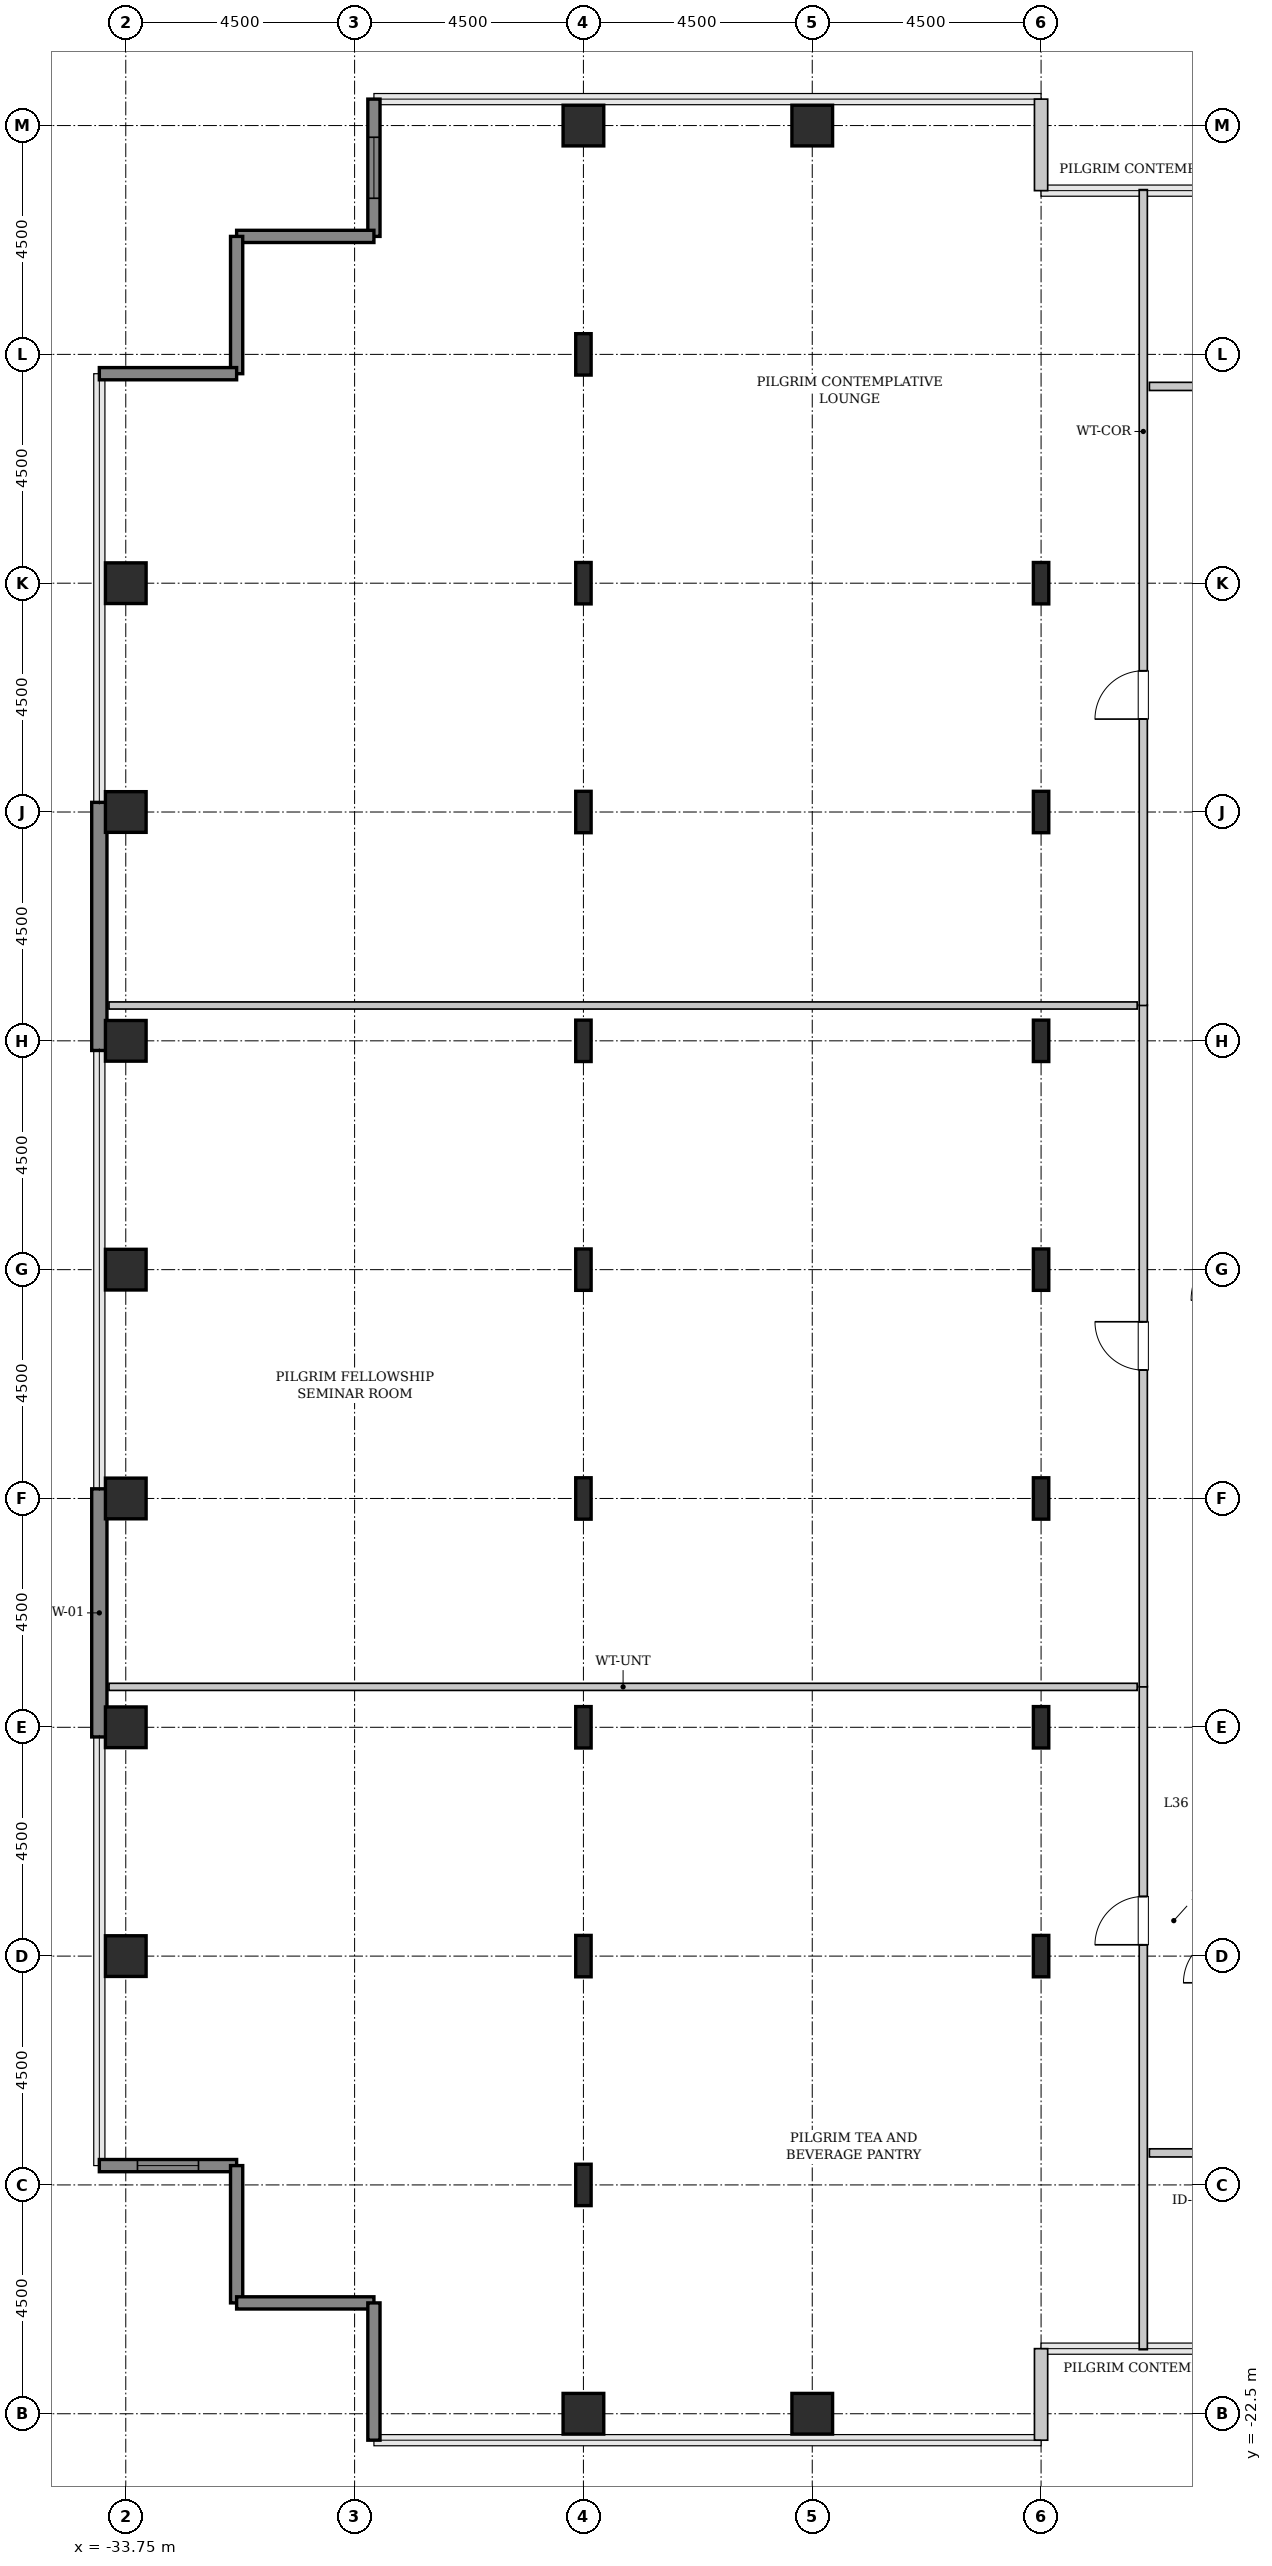
"""IFC4 building model, lengths in metres.
Left out: names, types, materials, properties, quantities, classifications, styles, units other than length and angle.
Written with IfcOpenShell. Run it as: python <this file> out.ifc"""

import sys

from ifc_helpers import new_model, si_unit, direction, frame, frame_2d, origin, origin_2d, place, context, subcontext, project, spatial, rectangle, hollow_rectangle, i_section, extrude, source, transform, mapped, element, fill, save


model = new_model("IFC4")
c1 = context("Model", 3, precision=1e-05, world=origin(), true_north=direction((0.0, 1.0)))
c2 = subcontext(c1, "Body", "Model", "MODEL_VIEW")
j1 = project(units=[si_unit("LENGTHUNIT", "METRE"), si_unit("PLANEANGLEUNIT", "RADIAN")], contexts=[c1])
p1 = place(None, origin())
s1 = spatial("IfcSite", under=j1, at=p1, CompositionType="ELEMENT")
p2 = place(p1, origin())
s2 = spatial("IfcBuilding", under=s1, at=p2, CompositionType="ELEMENT")
p3 = place(p2, frame((0.0, 0.0, 148.8)))
s3 = spatial("IfcBuildingStorey", under=s2, at=p3, CompositionType="ELEMENT", Elevation=148.8)
m1 = source(origin(), c2, "Body", "SweptSolid", [
    extrude(hollow_rectangle(XDim=0.8, YDim=0.8, WallThickness=0.04, InnerFilletRadius=0.04, OuterFilletRadius=0.08, at=origin_2d()), origin(), (0.0, 0.0, 1.0), 3.8),
])
for number, where, z_axis, x_axis in (
    (1, (-33.75, -13.5, 0.0), (0.0, 0.0, 1.0), (1.0, 0.0, 0.0)),
    (2, (-33.75, -9.0, 0.0), (0.0, 0.0, 1.0), (1.0, 0.0, 0.0)),
    (3, (-33.75, -4.5, 0.0), (0.0, 0.0, 1.0), (1.0, 0.0, 0.0)),
    (4, (-33.75, 0.0, 0.0), (0.0, 0.0, 1.0), (1.0, 0.0, 0.0)),
    (5, (-33.75, 4.5, 0.0), (0.0, 0.0, 1.0), (1.0, 0.0, 0.0)),
    (6, (-33.75, 9.0, 0.0), (0.0, 0.0, 1.0), (1.0, 0.0, 0.0)),
    (7, (-33.75, 13.5, 0.0), (0.0, 0.0, 1.0), (1.0, 0.0, 0.0)),
    (8, (-24.75, -22.5, 0.0), (0.0, 0.0, 1.0), (1.0, 0.0, 0.0)),
):
    element("IfcColumn", number, at=place(p3, frame(where, z_axis=z_axis, x_axis=x_axis)), inside=s3, PredefinedType="COLUMN", context=c2, shape_type="MappedRepresentation", body=[
        mapped(m1, transform((0.0, 0.0, 0.0), x_axis=(1.0, 0.0, 0.0), y_axis=(0.0, 1.0, 0.0), z_axis=(0.0, 0.0, 1.0), scale=1.0)),
    ])
m2 = source(origin(), c2, "Body", "SweptSolid", [
    extrude(i_section(OverallWidth=0.303, OverallDepth=0.814, WebThickness=0.021, FlangeThickness=0.04, FilletRadius=0.03, at=origin_2d()), origin(), (0.0, 0.0, 1.0), 3.8),
])
for number, where, z_axis, x_axis in (
    (9, (-24.75, -18.0, 0.0), (0.0, 0.0, 1.0), (1.0, 0.0, 0.0)),
    (10, (-24.75, -13.5, 0.0), (0.0, 0.0, 1.0), (1.0, 0.0, 0.0)),
    (11, (-24.75, -9.0, 0.0), (0.0, 0.0, 1.0), (1.0, 0.0, 0.0)),
    (12, (-24.75, -4.5, 0.0), (0.0, 0.0, 1.0), (1.0, 0.0, 0.0)),
    (13, (-24.75, 0.0, 0.0), (0.0, 0.0, 1.0), (1.0, 0.0, 0.0)),
    (14, (-24.75, 4.5, 0.0), (0.0, 0.0, 1.0), (1.0, 0.0, 0.0)),
    (15, (-24.75, 9.0, 0.0), (0.0, 0.0, 1.0), (1.0, 0.0, 0.0)),
    (16, (-24.75, 13.5, 0.0), (0.0, 0.0, 1.0), (1.0, 0.0, 0.0)),
    (17, (-24.75, 18.0, 0.0), (0.0, 0.0, 1.0), (1.0, 0.0, 0.0)),
):
    element("IfcColumn", number, at=place(p3, frame(where, z_axis=z_axis, x_axis=x_axis)), inside=s3, PredefinedType="COLUMN", context=c2, shape_type="MappedRepresentation", body=[
        mapped(m2, transform((0.0, 0.0, 0.0), x_axis=(1.0, 0.0, 0.0), y_axis=(0.0, 1.0, 0.0), z_axis=(0.0, 0.0, 1.0), scale=1.0)),
    ])
for number, where, z_axis, x_axis in (
    (18, (-24.75, 22.5, 0.0), (0.0, 0.0, 1.0), (1.0, 0.0, 0.0)),
    (19, (-20.25, -22.5, 0.0), (0.0, 0.0, 1.0), (1.0, 0.0, 0.0)),
    (20, (-20.25, 22.5, 0.0), (0.0, 0.0, 1.0), (1.0, 0.0, 0.0)),
):
    element("IfcColumn", number, at=place(p3, frame(where, z_axis=z_axis, x_axis=x_axis)), inside=s3, PredefinedType="COLUMN", context=c2, shape_type="MappedRepresentation", body=[
        mapped(m1, transform((0.0, 0.0, 0.0), x_axis=(1.0, 0.0, 0.0), y_axis=(0.0, 1.0, 0.0), z_axis=(0.0, 0.0, 1.0), scale=1.0)),
    ])
for number, where, z_axis, x_axis in (
    (21, (-15.75, -13.5, 0.0), (0.0, 0.0, 1.0), (1.0, 0.0, 0.0)),
    (22, (-15.75, -9.0, 0.0), (0.0, 0.0, 1.0), (1.0, 0.0, 0.0)),
    (23, (-15.75, -4.5, 0.0), (0.0, 0.0, 1.0), (1.0, 0.0, 0.0)),
    (24, (-15.75, 0.0, 0.0), (0.0, 0.0, 1.0), (1.0, 0.0, 0.0)),
    (25, (-15.75, 4.5, 0.0), (0.0, 0.0, 1.0), (1.0, 0.0, 0.0)),
    (26, (-15.75, 9.0, 0.0), (0.0, 0.0, 1.0), (1.0, 0.0, 0.0)),
    (27, (-15.75, 13.5, 0.0), (0.0, 0.0, 1.0), (1.0, 0.0, 0.0)),
):
    element("IfcColumn", number, at=place(p3, frame(where, z_axis=z_axis, x_axis=x_axis)), inside=s3, PredefinedType="COLUMN", context=c2, shape_type="MappedRepresentation", body=[
        mapped(m2, transform((0.0, 0.0, 0.0), x_axis=(1.0, 0.0, 0.0), y_axis=(0.0, 1.0, 0.0), z_axis=(0.0, 0.0, 1.0), scale=1.0)),
    ])
m3 = source(origin(), c2, "Body", "SweptSolid", [
    extrude(rectangle(XDim=4.88, YDim=0.3, at=frame_2d((2.44, 0.0))), origin(), (0.0, 0.0, 1.0), 3.55),
])
for number, where, z_axis, x_axis in (
    (28, (-34.27, -9.19, 0.0), (0.0, 0.0, 1.0), (0.0, 1.0, 0.0)),
    (29, (-34.27, 4.31, 0.0), (0.0, 0.0, 1.0), (0.0, 1.0, 0.0)),
):
    element("IfcWall", number, at=place(p3, frame(where, z_axis=z_axis, x_axis=x_axis)), inside=s3, PredefinedType="SHEAR", context=c2, shape_type="MappedRepresentation", body=[
        mapped(m3, transform((0.0, 0.0, 0.0), x_axis=(1.0, 0.0, 0.0), y_axis=(0.0, 1.0, 0.0), z_axis=(0.0, 0.0, 1.0), scale=1.0)),
    ])
m4 = source(origin(), c2, "Body", "SweptSolid", [
    extrude(rectangle(XDim=1.8, YDim=0.26, at=frame_2d((0.9, 0.0))), origin(), (0.0, 0.0, 1.0), 3.55),
])
p4 = place(p3, frame((-15.75, 21.22, 0.0), z_axis=(0.0, 0.0, 1.0), x_axis=(0.0, 1.0, 0.0)))
e30 = element("IfcWall", 30, at=p4, inside=s3, PredefinedType="SOLIDWALL", context=c2, shape_type="MappedRepresentation", body=[
    mapped(m4, transform((0.0, 0.0, 0.0), x_axis=(1.0, 0.0, 0.0), y_axis=(0.0, 1.0, 0.0), z_axis=(0.0, 0.0, 1.0), scale=1.0)),
])
m5 = source(origin(), c2, "Body", "SweptSolid", [
    extrude(rectangle(XDim=2.7, YDim=0.24, at=frame_2d((1.35, 0.0))), origin(), (0.0, 0.0, 1.0), 3.55),
])
p5 = place(p3, frame((-28.87, 23.02, 0.0), z_axis=(0.0, 0.0, 1.0), x_axis=(0.0, -1.0, 0.0)))
e31 = element("IfcWall", 31, at=p5, inside=s3, PredefinedType="SHEAR", context=c2, shape_type="MappedRepresentation", body=[
    mapped(m5, transform((0.0, 0.0, 0.0), x_axis=(1.0, 0.0, 0.0), y_axis=(0.0, 1.0, 0.0), z_axis=(0.0, 0.0, 1.0), scale=1.0)),
])
p6 = place(p5, frame((0.75, 0.0, 0.85)))
e32 = element("IfcOpeningElement", 32, at=p6, cuts=e31, PredefinedType="OPENING", context=c2, shape_type="SweptSolid", body=[
    extrude(rectangle(XDim=1.2, YDim=1.8, at=frame_2d((0.6, 0.9))), frame((0.0, 0.13, 0.0), z_axis=(0.0, -1.0, 0.0), x_axis=(1.0, 0.0, 0.0)), (0.0, 0.0, 1.0), 0.26),
])
for number, where, z_axis, x_axis in (
    (33, (-28.87, 20.32, 0.0), (0.0, 0.0, 1.0), (-1.0, 0.0, 0.0)),
    (34, (-31.57, 20.32, 0.0), (0.0, 0.0, 1.0), (0.0, -1.0, 0.0)),
    (35, (-31.57, 17.62, 0.0), (0.0, 0.0, 1.0), (-1.0, 0.0, 0.0)),
):
    element("IfcWall", number, at=place(p3, frame(where, z_axis=z_axis, x_axis=x_axis)), inside=s3, PredefinedType="SHEAR", context=c2, shape_type="MappedRepresentation", body=[
        mapped(m5, transform((0.0, 0.0, 0.0), x_axis=(1.0, 0.0, 0.0), y_axis=(0.0, 1.0, 0.0), z_axis=(0.0, 0.0, 1.0), scale=1.0)),
    ])
p7 = place(p3, frame((-34.27, -17.62, 0.0), z_axis=(0.0, 0.0, 1.0), x_axis=(1.0, 0.0, 0.0)))
e36 = element("IfcWall", 36, at=p7, inside=s3, PredefinedType="SHEAR", context=c2, shape_type="MappedRepresentation", body=[
    mapped(m5, transform((0.0, 0.0, 0.0), x_axis=(1.0, 0.0, 0.0), y_axis=(0.0, 1.0, 0.0), z_axis=(0.0, 0.0, 1.0), scale=1.0)),
])
p8 = place(p7, frame((0.75, 0.0, 0.85)))
e37 = element("IfcOpeningElement", 37, at=p8, cuts=e36, PredefinedType="OPENING", context=c2, shape_type="SweptSolid", body=[
    extrude(rectangle(XDim=1.2, YDim=1.8, at=frame_2d((0.6, 0.9))), frame((0.0, 0.13, 0.0), z_axis=(0.0, -1.0, 0.0), x_axis=(1.0, 0.0, 0.0)), (0.0, 0.0, 1.0), 0.26),
])
for number, where, z_axis, x_axis in (
    (38, (-31.57, -17.62, 0.0), (0.0, 0.0, 1.0), (0.0, -1.0, 0.0)),
    (39, (-31.57, -20.32, 0.0), (0.0, 0.0, 1.0), (1.0, 0.0, 0.0)),
    (40, (-28.87, -20.32, 0.0), (0.0, 0.0, 1.0), (0.0, -1.0, 0.0)),
):
    element("IfcWall", number, at=place(p3, frame(where, z_axis=z_axis, x_axis=x_axis)), inside=s3, PredefinedType="SHEAR", context=c2, shape_type="MappedRepresentation", body=[
        mapped(m5, transform((0.0, 0.0, 0.0), x_axis=(1.0, 0.0, 0.0), y_axis=(0.0, 1.0, 0.0), z_axis=(0.0, 0.0, 1.0), scale=1.0)),
    ])
p9 = place(p3, frame((-15.75, -23.02, 0.0), z_axis=(0.0, 0.0, 1.0), x_axis=(0.0, 1.0, 0.0)))
e41 = element("IfcWall", 41, at=p9, inside=s3, PredefinedType="SOLIDWALL", context=c2, shape_type="MappedRepresentation", body=[
    mapped(m4, transform((0.0, 0.0, 0.0), x_axis=(1.0, 0.0, 0.0), y_axis=(0.0, 1.0, 0.0), z_axis=(0.0, 0.0, 1.0), scale=1.0)),
])
m6 = source(origin(), c2, "Body", "SweptSolid", [
    extrude(rectangle(XDim=13.045, YDim=0.16, at=frame_2d((6.522, 0.0))), origin(), (0.0, 0.0, 1.0), 3.535),
])
p10 = place(p3, frame((-13.74, -21.24, 0.0), z_axis=(0.0, 0.0, 1.0), x_axis=(0.0, 1.0, 0.0)))
e42 = element("IfcWall", 42, at=p10, inside=s3, PredefinedType="PARTITIONING", context=c2, shape_type="MappedRepresentation", body=[
    mapped(m6, transform((0.0, 0.0, 0.0), x_axis=(1.0, 0.0, 0.0), y_axis=(0.0, 1.0, 0.0), z_axis=(0.0, 0.0, 1.0), scale=1.0)),
])
p11 = place(p10, frame((7.962, 0.0, 0.0)))
e43 = element("IfcOpeningElement", 43, at=p11, cuts=e42, PredefinedType="OPENING", context=c2, shape_type="SweptSolid", body=[
    extrude(rectangle(XDim=0.95, YDim=2.1, at=frame_2d((0.475, 1.05))), frame((0.0, 0.09, 0.0), z_axis=(0.0, -1.0, 0.0), x_axis=(1.0, 0.0, 0.0)), (0.0, 0.0, 1.0), 0.18),
])
m7 = source(origin(), c2, "Body", "SweptSolid", [
    extrude(rectangle(XDim=20.22, YDim=0.14, at=frame_2d((10.11, 0.0))), origin(), (0.0, 0.0, 1.0), 3.535),
])
p12 = place(p3, frame((-34.08, -8.205, 0.0), z_axis=(0.0, 0.0, 1.0), x_axis=(1.0, 0.0, 0.0)))
e44 = element("IfcWall", 44, at=p12, inside=s3, PredefinedType="PARTITIONING", context=c2, shape_type="MappedRepresentation", body=[
    mapped(m7, transform((0.0, 0.0, 0.0), x_axis=(1.0, 0.0, 0.0), y_axis=(0.0, 1.0, 0.0), z_axis=(0.0, 0.0, 1.0), scale=1.0)),
])
m8 = source(origin(), c2, "Body", "SweptSolid", [
    extrude(rectangle(XDim=13.41, YDim=0.16, at=frame_2d((6.705, 0.0))), origin(), (0.0, 0.0, 1.0), 3.535),
])
p13 = place(p3, frame((-13.74, -8.205, 0.0), z_axis=(0.0, 0.0, 1.0), x_axis=(0.0, 1.0, 0.0)))
e45 = element("IfcWall", 45, at=p13, inside=s3, PredefinedType="PARTITIONING", context=c2, shape_type="MappedRepresentation", body=[
    mapped(m8, transform((0.0, 0.0, 0.0), x_axis=(1.0, 0.0, 0.0), y_axis=(0.0, 1.0, 0.0), z_axis=(0.0, 0.0, 1.0), scale=1.0)),
])
p14 = place(p13, frame((6.23, 0.0, 0.0)))
e46 = element("IfcOpeningElement", 46, at=p14, cuts=e45, PredefinedType="OPENING", context=c2, shape_type="SweptSolid", body=[
    extrude(rectangle(XDim=0.95, YDim=2.1, at=frame_2d((0.475, 1.05))), frame((0.0, 0.09, 0.0), z_axis=(0.0, -1.0, 0.0), x_axis=(1.0, 0.0, 0.0)), (0.0, 0.0, 1.0), 0.18),
])
p15 = place(p3, frame((-34.08, 5.195, 0.0), z_axis=(0.0, 0.0, 1.0), x_axis=(1.0, 0.0, 0.0)))
e47 = element("IfcWall", 47, at=p15, inside=s3, PredefinedType="PARTITIONING", context=c2, shape_type="MappedRepresentation", body=[
    mapped(m7, transform((0.0, 0.0, 0.0), x_axis=(1.0, 0.0, 0.0), y_axis=(0.0, 1.0, 0.0), z_axis=(0.0, 0.0, 1.0), scale=1.0)),
])
m9 = source(origin(), c2, "Body", "SweptSolid", [
    extrude(rectangle(XDim=16.045, YDim=0.16, at=frame_2d((8.022, 0.0))), origin(), (0.0, 0.0, 1.0), 3.535),
])
p16 = place(p3, frame((-13.74, 5.195, 0.0), z_axis=(0.0, 0.0, 1.0), x_axis=(0.0, 1.0, 0.0)))
e48 = element("IfcWall", 48, at=p16, inside=s3, PredefinedType="PARTITIONING", context=c2, shape_type="MappedRepresentation", body=[
    mapped(m9, transform((0.0, 0.0, 0.0), x_axis=(1.0, 0.0, 0.0), y_axis=(0.0, 1.0, 0.0), z_axis=(0.0, 0.0, 1.0), scale=1.0)),
])
p17 = place(p16, frame((5.633, 0.0, 0.0)))
e49 = element("IfcOpeningElement", 49, at=p17, cuts=e48, PredefinedType="OPENING", context=c2, shape_type="SweptSolid", body=[
    extrude(rectangle(XDim=0.95, YDim=2.1, at=frame_2d((0.475, 1.05))), frame((0.0, 0.09, 0.0), z_axis=(0.0, -1.0, 0.0), x_axis=(1.0, 0.0, 0.0)), (0.0, 0.0, 1.0), 0.18),
])
m10 = source(origin(), c2, "Body", "SweptSolid", [
    extrude(rectangle(XDim=4.16, YDim=0.16, at=frame_2d((2.08, 0.0))), origin(), (0.0, 0.0, 1.0), 3.535),
])
p18 = place(p3, frame((-13.62, 17.37, 0.0), z_axis=(0.0, 0.0, 1.0), x_axis=(1.0, 0.0, 0.0)))
e50 = element("IfcWall", 50, at=p18, inside=s3, PredefinedType="PARTITIONING", context=c2, shape_type="MappedRepresentation", body=[
    mapped(m10, transform((0.0, 0.0, 0.0), x_axis=(1.0, 0.0, 0.0), y_axis=(0.0, 1.0, 0.0), z_axis=(0.0, 0.0, 1.0), scale=1.0)),
])
p19 = place(p18, frame((0.969, 0.0, 0.0)))
e51 = element("IfcOpeningElement", 51, at=p19, cuts=e50, PredefinedType="OPENING", context=c2, shape_type="SweptSolid", body=[
    extrude(rectangle(XDim=0.95, YDim=2.1, at=frame_2d((0.475, 1.05))), frame((0.0, 0.09, 0.0), z_axis=(0.0, -1.0, 0.0), x_axis=(1.0, 0.0, 0.0)), (0.0, 0.0, 1.0), 0.18),
])
m11 = source(origin(), c2, "Body", "SweptSolid", [
    extrude(rectangle(XDim=4.425, YDim=0.16, at=frame_2d((2.212, 0.0))), origin(), (0.0, 0.0, 1.0), 3.535),
])
p20 = place(p3, frame((-13.62, -17.37, 0.0), z_axis=(0.0, 0.0, 1.0), x_axis=(1.0, 0.0, 0.0)))
e52 = element("IfcWall", 52, at=p20, inside=s3, PredefinedType="PARTITIONING", context=c2, shape_type="MappedRepresentation", body=[
    mapped(m11, transform((0.0, 0.0, 0.0), x_axis=(1.0, 0.0, 0.0), y_axis=(0.0, 1.0, 0.0), z_axis=(0.0, 0.0, 1.0), scale=1.0)),
])
p21 = place(p20, frame((1.038, 0.0, 0.0)))
e53 = element("IfcOpeningElement", 53, at=p21, cuts=e52, PredefinedType="OPENING", context=c2, shape_type="SweptSolid", body=[
    extrude(rectangle(XDim=0.95, YDim=2.1, at=frame_2d((0.475, 1.05))), frame((0.0, 0.09, 0.0), z_axis=(0.0, -1.0, 0.0), x_axis=(1.0, 0.0, 0.0)), (0.0, 0.0, 1.0), 0.18),
])
m12 = source(origin(), c2, "Body", "SweptSolid", [
    extrude(rectangle(XDim=1.2, YDim=1.8, at=frame_2d((0.6, 0.9))), frame((0.0, 0.03, 0.0), z_axis=(0.0, -1.0, 0.0), x_axis=(1.0, 0.0, 0.0)), (0.0, 0.0, 1.0), 0.06),
])
p22 = place(p6, origin())
e54 = element("IfcWindow", 54, at=p22, inside=s3, PartitioningType="SINGLE_PANEL", PredefinedType="WINDOW", context=c2, shape_type="MappedRepresentation", body=[
    mapped(m12, transform((0.0, 0.0, 0.0), x_axis=(1.0, 0.0, 0.0), y_axis=(0.0, 1.0, 0.0), z_axis=(0.0, 0.0, 1.0), scale=1.0)),
])
fill(e32, e54)
p23 = place(p8, origin())
e55 = element("IfcWindow", 55, at=p23, inside=s3, PartitioningType="SINGLE_PANEL", PredefinedType="WINDOW", context=c2, shape_type="MappedRepresentation", body=[
    mapped(m12, transform((0.0, 0.0, 0.0), x_axis=(1.0, 0.0, 0.0), y_axis=(0.0, 1.0, 0.0), z_axis=(0.0, 0.0, 1.0), scale=1.0)),
])
fill(e37, e55)
m13 = source(origin(), c2, "Body", "SweptSolid", [
    extrude(rectangle(XDim=0.95, YDim=2.1, at=frame_2d((0.475, 1.05))), frame((0.0, 0.025, 0.0), z_axis=(0.0, -1.0, 0.0), x_axis=(1.0, 0.0, 0.0)), (0.0, 0.0, 1.0), 0.05),
])
p24 = place(p11, origin())
e56 = element("IfcDoor", 56, at=p24, inside=s3, OperationType="SINGLE_SWING_LEFT", PredefinedType="DOOR", context=c2, shape_type="MappedRepresentation", body=[
    mapped(m13, transform((0.0, 0.0, 0.0), x_axis=(1.0, 0.0, 0.0), y_axis=(0.0, 1.0, 0.0), z_axis=(0.0, 0.0, 1.0), scale=1.0)),
])
fill(e43, e56)
p25 = place(p14, origin())
e57 = element("IfcDoor", 57, at=p25, inside=s3, OperationType="SINGLE_SWING_RIGHT", PredefinedType="DOOR", context=c2, shape_type="MappedRepresentation", body=[
    mapped(m13, transform((0.0, 0.0, 0.0), x_axis=(1.0, 0.0, 0.0), y_axis=(0.0, 1.0, 0.0), z_axis=(0.0, 0.0, 1.0), scale=1.0)),
])
fill(e46, e57)
p26 = place(p17, origin())
e58 = element("IfcDoor", 58, at=p26, inside=s3, OperationType="SINGLE_SWING_LEFT", PredefinedType="DOOR", context=c2, shape_type="MappedRepresentation", body=[
    mapped(m13, transform((0.0, 0.0, 0.0), x_axis=(1.0, 0.0, 0.0), y_axis=(0.0, 1.0, 0.0), z_axis=(0.0, 0.0, 1.0), scale=1.0)),
])
fill(e49, e58)
save(model, sys.argv[1])
